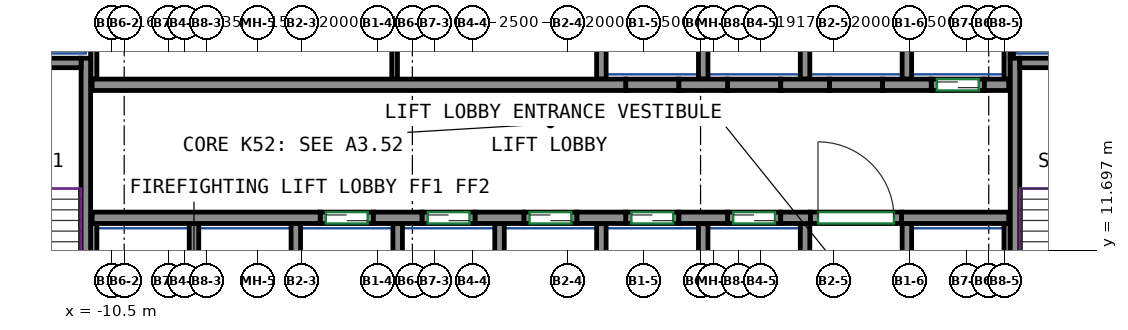
"""IFC4 building model, lengths in metres.
Left out: names, types, materials, properties, quantities, classifications, styles, units other than length and angle.
Written with IfcOpenShell. Run it as: python <this file> out.ifc"""

import sys

from ifc_helpers import new_model, si_unit, direction, frame, frame_2d, origin, place, context, subcontext, project, spatial, rectangle, extrude, source, transform, mapped, element, fill, save


model = new_model("IFC4")
c1 = context("Model", 3, precision=1e-05, world=origin(), true_north=direction((0.0, 1.0)))
c2 = subcontext(c1, "Body", "Model", "MODEL_VIEW")
j1 = project(units=[si_unit("LENGTHUNIT", "METRE"), si_unit("PLANEANGLEUNIT", "RADIAN")], contexts=[c1])
p1 = place(None, origin())
s1 = spatial("IfcSite", under=j1, at=p1, CompositionType="ELEMENT")
p2 = place(p1, origin())
s2 = spatial("IfcBuilding", under=s1, at=p2, CompositionType="ELEMENT")
p3 = place(p2, frame((0.0, 0.0, 210.1)))
s3 = spatial("IfcBuildingStorey", under=s2, at=p3, CompositionType="ELEMENT", Elevation=210.1)
m1 = source(origin(), c2, "Body", "SweptSolid", [
    extrude(rectangle(XDim=7.75, YDim=0.25, at=frame_2d((3.875, 0.0))), origin(), (0.0, 0.0, 1.0), 3.12),
])
p4 = place(p3, frame((-11.175, 9.0, 0.0), z_axis=(0.0, 0.0, 1.0), x_axis=(0.0, 1.0, 0.0)))
e1 = element("IfcWall", 1, at=p4, inside=s3, PredefinedType="SHEAR", context=c2, shape_type="MappedRepresentation", body=[
    mapped(m1, transform((0.0, 0.0, 0.0))),
])
m2 = source(origin(), c2, "Body", "SweptSolid", [
    extrude(rectangle(XDim=3.7, YDim=0.25, at=frame_2d((1.85, 0.0))), origin(), (0.0, 0.0, 1.0), 3.12),
])
p5 = place(p3, frame((-15.0, 16.625, 0.0), z_axis=(0.0, 0.0, 1.0), x_axis=(1.0, 0.0, 0.0)))
e2 = element("IfcWall", 2, at=p5, inside=s3, PredefinedType="SHEAR", context=c2, shape_type="MappedRepresentation", body=[
    mapped(m2, transform((0.0, 0.0, 0.0))),
])
p6 = place(p3, frame((13.275, 9.0, 0.0), z_axis=(0.0, 0.0, 1.0), x_axis=(0.0, 1.0, 0.0)))
e3 = element("IfcWall", 3, at=p6, inside=s3, PredefinedType="SHEAR", context=c2, shape_type="MappedRepresentation", body=[
    mapped(m1, transform((0.0, 0.0, 0.0))),
])
m3 = source(origin(), c2, "Body", "SweptSolid", [
    extrude(rectangle(XDim=3.7, YDim=0.25, at=frame_2d((1.85, 0.0))), origin(), (0.0, 0.0, 1.0), 3.12),
])
p7 = place(p3, frame((13.4, 16.625, 0.0), z_axis=(0.0, 0.0, 1.0), x_axis=(1.0, 0.0, 0.0)))
e4 = element("IfcWall", 4, at=p7, inside=s3, PredefinedType="SHEAR", context=c2, shape_type="MappedRepresentation", body=[
    mapped(m3, transform((0.0, 0.0, 0.0))),
])
m4 = source(origin(), c2, "Body", "SweptSolid", [
    extrude(rectangle(XDim=6.0, YDim=0.3, at=frame_2d((3.0, 0.0))), origin(), (0.0, 0.0, 1.0), 3.12),
])
p8 = place(p3, frame((-11.01, 12.55, 0.0), z_axis=(0.0, 0.0, 1.0), x_axis=(1.0, 0.0, 0.0)))
e5 = element("IfcWall", 5, at=p8, inside=s3, PredefinedType="SHEAR", context=c2, shape_type="MappedRepresentation", body=[
    mapped(m4, transform((0.0, 0.0, 0.0))),
])
m5 = source(origin(), c2, "Body", "SweptSolid", [
    extrude(rectangle(XDim=1.28, YDim=0.3, at=frame_2d((0.64, 0.0))), origin(), (0.0, 0.0, 1.0), 3.12),
])
for number, where, z_axis, x_axis in (
    (6, (-3.61, 12.55, 0.0), (0.0, 0.0, 1.0), (1.0, 0.0, 0.0)),
    (7, (-0.93, 12.55, 0.0), (0.0, 0.0, 1.0), (1.0, 0.0, 0.0)),
    (8, (1.75, 12.55, 0.0), (0.0, 0.0, 1.0), (1.0, 0.0, 0.0)),
    (9, (4.43, 12.55, 0.0), (0.0, 0.0, 1.0), (1.0, 0.0, 0.0)),
):
    element("IfcWall", number, at=place(p3, frame(where, z_axis=z_axis, x_axis=x_axis)), inside=s3, PredefinedType="SHEAR", context=c2, shape_type="MappedRepresentation", body=[
        mapped(m5, transform((0.0, 0.0, 0.0))),
    ])
m6 = source(origin(), c2, "Body", "SweptSolid", [
    extrude(rectangle(XDim=0.78, YDim=0.3, at=frame_2d((0.39, 0.0))), origin(), (0.0, 0.0, 1.0), 3.12),
])
p9 = place(p3, frame((7.11, 12.55, 0.0), z_axis=(0.0, 0.0, 1.0), x_axis=(1.0, 0.0, 0.0)))
e10 = element("IfcWall", 10, at=p9, inside=s3, PredefinedType="SHEAR", context=c2, shape_type="MappedRepresentation", body=[
    mapped(m6, transform((0.0, 0.0, 0.0))),
])
m7 = source(origin(), c2, "Body", "SweptSolid", [
    extrude(rectangle(XDim=2.82, YDim=0.3, at=frame_2d((1.41, 0.0))), origin(), (0.0, 0.0, 1.0), 3.12),
])
p10 = place(p3, frame((10.29, 12.55, 0.0), z_axis=(0.0, 0.0, 1.0), x_axis=(1.0, 0.0, 0.0)))
e11 = element("IfcWall", 11, at=p10, inside=s3, PredefinedType="SHEAR", context=c2, shape_type="MappedRepresentation", body=[
    mapped(m7, transform((0.0, 0.0, 0.0))),
])
m8 = source(origin(), c2, "Body", "SweptSolid", [
    extrude(rectangle(XDim=14.04, YDim=0.3, at=frame_2d((7.02, 0.0))), origin(), (0.0, 0.0, 1.0), 3.12),
])
p11 = place(p3, frame((-11.01, 16.05, 0.0), z_axis=(0.0, 0.0, 1.0), x_axis=(1.0, 0.0, 0.0)))
e12 = element("IfcWall", 12, at=p11, inside=s3, PredefinedType="SHEAR", context=c2, shape_type="MappedRepresentation", body=[
    mapped(m8, transform((0.0, 0.0, 0.0))),
])
p12 = place(p3, frame((4.43, 16.05, 0.0), z_axis=(0.0, 0.0, 1.0), x_axis=(1.0, 0.0, 0.0)))
e13 = element("IfcWall", 13, at=p12, inside=s3, PredefinedType="SHEAR", context=c2, shape_type="MappedRepresentation", body=[
    mapped(m5, transform((0.0, 0.0, 0.0))),
])
m9 = source(origin(), c2, "Body", "SweptSolid", [
    extrude(rectangle(XDim=1.28, YDim=0.3, at=frame_2d((0.64, 0.0))), origin(), (0.0, 0.0, 1.0), 3.12),
])
p13 = place(p3, frame((7.11, 16.05, 0.0), z_axis=(0.0, 0.0, 1.0), x_axis=(1.0, 0.0, 0.0)))
e14 = element("IfcWall", 14, at=p13, inside=s3, PredefinedType="SHEAR", context=c2, shape_type="MappedRepresentation", body=[
    mapped(m9, transform((0.0, 0.0, 0.0))),
])
p14 = place(p3, frame((9.79, 16.05, 0.0), z_axis=(0.0, 0.0, 1.0), x_axis=(1.0, 0.0, 0.0)))
e15 = element("IfcWall", 15, at=p14, inside=s3, PredefinedType="SHEAR", context=c2, shape_type="MappedRepresentation", body=[
    mapped(m5, transform((0.0, 0.0, 0.0))),
])
m10 = source(origin(), c2, "Body", "SweptSolid", [
    extrude(rectangle(XDim=0.64, YDim=0.3, at=frame_2d((0.32, 0.0))), origin(), (0.0, 0.0, 1.0), 3.12),
])
p15 = place(p3, frame((12.47, 16.05, 0.0), z_axis=(0.0, 0.0, 1.0), x_axis=(1.0, 0.0, 0.0)))
e16 = element("IfcWall", 16, at=p15, inside=s3, PredefinedType="SHEAR", context=c2, shape_type="MappedRepresentation", body=[
    mapped(m10, transform((0.0, 0.0, 0.0))),
])
m11 = source(origin(), c2, "Body", "SweptSolid", [
    extrude(rectangle(XDim=1.4, YDim=0.3, at=frame_2d((0.7, 0.0))), origin(), (0.0, 0.0, 1.0), 3.12),
])
p16 = place(p3, frame((-5.01, 12.55, 0.0), z_axis=(0.0, 0.0, 1.0), x_axis=(1.0, 0.0, 0.0)))
e17 = element("IfcWall", 17, at=p16, inside=s3, PredefinedType="PARTITIONING", context=c2, shape_type="MappedRepresentation", body=[
    mapped(m11, transform((0.0, 0.0, 0.0))),
])
p17 = place(p16, frame((0.15, 0.0, 0.0)))
e18 = element("IfcOpeningElement", 18, at=p17, cuts=e17, PredefinedType="OPENING", context=c2, shape_type="SweptSolid", body=[
    extrude(rectangle(XDim=1.1, YDim=2.1, at=frame_2d((0.55, 1.05))), frame((0.0, 0.16, 0.0), z_axis=(0.0, -1.0, 0.0), x_axis=(1.0, 0.0, 0.0)), (0.0, 0.0, 1.0), 0.32),
])
m12 = source(origin(), c2, "Body", "SweptSolid", [
    extrude(rectangle(XDim=1.4, YDim=0.3, at=frame_2d((0.7, 0.0))), origin(), (0.0, 0.0, 1.0), 3.12),
])
p18 = place(p3, frame((-2.33, 12.55, 0.0), z_axis=(0.0, 0.0, 1.0), x_axis=(1.0, 0.0, 0.0)))
e19 = element("IfcWall", 19, at=p18, inside=s3, PredefinedType="PARTITIONING", context=c2, shape_type="MappedRepresentation", body=[
    mapped(m12, transform((0.0, 0.0, 0.0))),
])
p19 = place(p18, frame((0.15, 0.0, 0.0)))
e20 = element("IfcOpeningElement", 20, at=p19, cuts=e19, PredefinedType="OPENING", context=c2, shape_type="SweptSolid", body=[
    extrude(rectangle(XDim=1.1, YDim=2.1, at=frame_2d((0.55, 1.05))), frame((0.0, 0.16, 0.0), z_axis=(0.0, -1.0, 0.0), x_axis=(1.0, 0.0, 0.0)), (0.0, 0.0, 1.0), 0.32),
])
p20 = place(p3, frame((0.35, 12.55, 0.0), z_axis=(0.0, 0.0, 1.0), x_axis=(1.0, 0.0, 0.0)))
e21 = element("IfcWall", 21, at=p20, inside=s3, PredefinedType="PARTITIONING", context=c2, shape_type="MappedRepresentation", body=[
    mapped(m11, transform((0.0, 0.0, 0.0))),
])
p21 = place(p20, frame((0.15, 0.0, 0.0)))
e22 = element("IfcOpeningElement", 22, at=p21, cuts=e21, PredefinedType="OPENING", context=c2, shape_type="SweptSolid", body=[
    extrude(rectangle(XDim=1.1, YDim=2.1, at=frame_2d((0.55, 1.05))), frame((0.0, 0.16, 0.0), z_axis=(0.0, -1.0, 0.0), x_axis=(1.0, 0.0, 0.0)), (0.0, 0.0, 1.0), 0.32),
])
p22 = place(p3, frame((3.03, 12.55, 0.0), z_axis=(0.0, 0.0, 1.0), x_axis=(1.0, 0.0, 0.0)))
e23 = element("IfcWall", 23, at=p22, inside=s3, PredefinedType="PARTITIONING", context=c2, shape_type="MappedRepresentation", body=[
    mapped(m11, transform((0.0, 0.0, 0.0))),
])
p23 = place(p22, frame((0.15, 0.0, 0.0)))
e24 = element("IfcOpeningElement", 24, at=p23, cuts=e23, PredefinedType="OPENING", context=c2, shape_type="SweptSolid", body=[
    extrude(rectangle(XDim=1.1, YDim=2.1, at=frame_2d((0.55, 1.05))), frame((0.0, 0.16, 0.0), z_axis=(0.0, -1.0, 0.0), x_axis=(1.0, 0.0, 0.0)), (0.0, 0.0, 1.0), 0.32),
])
p24 = place(p3, frame((5.71, 12.55, 0.0), z_axis=(0.0, 0.0, 1.0), x_axis=(1.0, 0.0, 0.0)))
e25 = element("IfcWall", 25, at=p24, inside=s3, PredefinedType="PARTITIONING", context=c2, shape_type="MappedRepresentation", body=[
    mapped(m12, transform((0.0, 0.0, 0.0))),
])
p25 = place(p24, frame((0.15, 0.0, 0.0)))
e26 = element("IfcOpeningElement", 26, at=p25, cuts=e25, PredefinedType="OPENING", context=c2, shape_type="SweptSolid", body=[
    extrude(rectangle(XDim=1.1, YDim=2.1, at=frame_2d((0.55, 1.05))), frame((0.0, 0.16, 0.0), z_axis=(0.0, -1.0, 0.0), x_axis=(1.0, 0.0, 0.0)), (0.0, 0.0, 1.0), 0.32),
])
p26 = place(p3, frame((11.07, 16.05, 0.0), z_axis=(0.0, 0.0, 1.0), x_axis=(1.0, 0.0, 0.0)))
e27 = element("IfcWall", 27, at=p26, inside=s3, PredefinedType="PARTITIONING", context=c2, shape_type="MappedRepresentation", body=[
    mapped(m11, transform((0.0, 0.0, 0.0))),
])
p27 = place(p26, frame((0.15, 0.0, 0.0)))
e28 = element("IfcOpeningElement", 28, at=p27, cuts=e27, PredefinedType="OPENING", context=c2, shape_type="SweptSolid", body=[
    extrude(rectangle(XDim=1.1, YDim=2.1, at=frame_2d((0.55, 1.05))), frame((0.0, 0.16, 0.0), z_axis=(0.0, -1.0, 0.0), x_axis=(1.0, 0.0, 0.0)), (0.0, 0.0, 1.0), 0.32),
])
m13 = source(origin(), c2, "Body", "SweptSolid", [
    extrude(rectangle(XDim=2.4, YDim=0.3, at=frame_2d((1.2, 0.0))), origin(), (0.0, 0.0, 1.0), 3.12),
])
p28 = place(p3, frame((7.89, 12.55, 0.0), z_axis=(0.0, 0.0, 1.0), x_axis=(1.0, 0.0, 0.0)))
e29 = element("IfcWall", 29, at=p28, inside=s3, PredefinedType="PARTITIONING", context=c2, shape_type="MappedRepresentation", body=[
    mapped(m13, transform((0.0, 0.0, 0.0))),
])
p29 = place(p28, frame((0.2, 0.0, 0.0)))
e30 = element("IfcOpeningElement", 30, at=p29, cuts=e29, PredefinedType="OPENING", context=c2, shape_type="SweptSolid", body=[
    extrude(rectangle(XDim=2.0, YDim=2.1, at=frame_2d((1.0, 1.05))), frame((0.0, 0.16, 0.0), z_axis=(0.0, -1.0, 0.0), x_axis=(1.0, 0.0, 0.0)), (0.0, 0.0, 1.0), 0.32),
])
p30 = place(p3, frame((3.03, 16.05, 0.0), z_axis=(0.0, 0.0, 1.0), x_axis=(1.0, 0.0, 0.0)))
e31 = element("IfcWall", 31, at=p30, inside=s3, PredefinedType="PARTITIONING", context=c2, shape_type="MappedRepresentation", body=[
    mapped(m11, transform((0.0, 0.0, 0.0))),
])
for number, where, z_axis, x_axis in (
    (32, (5.71, 16.05, 0.0), (0.0, 0.0, 1.0), (1.0, 0.0, 0.0)),
    (33, (8.39, 16.05, 0.0), (0.0, 0.0, 1.0), (1.0, 0.0, 0.0)),
):
    element("IfcWall", number, at=place(p3, frame(where, z_axis=z_axis, x_axis=x_axis)), inside=s3, PredefinedType="PARTITIONING", context=c2, shape_type="MappedRepresentation", body=[
        mapped(m12, transform((0.0, 0.0, 0.0))),
    ])
m14 = source(origin(), c2, "Body", "SweptSolid", [
    extrude(rectangle(XDim=3.275, YDim=0.165, at=frame_2d((1.638, 0.0))), origin(), (0.0, 0.0, 1.0), 3.12),
])
p31 = place(p3, frame((13.067, 16.2, 0.0), z_axis=(0.0, 0.0, 1.0), x_axis=(0.0, 1.0, 0.0)))
e34 = element("IfcWall", 34, at=p31, inside=s3, PredefinedType="PARTITIONING", context=c2, shape_type="MappedRepresentation", body=[
    mapped(m14, transform((0.0, 0.0, 0.0))),
])
m15 = source(origin(), c2, "Body", "SweptSolid", [
    extrude(rectangle(XDim=4.8, YDim=0.165, at=frame_2d((2.4, 0.0))), origin(), (0.0, 0.0, 1.0), 3.12),
])
p32 = place(p3, frame((-10.968, 16.2, 0.0), z_axis=(0.0, 0.0, 1.0), x_axis=(0.0, 1.0, 0.0)))
e35 = element("IfcWall", 35, at=p32, inside=s3, PredefinedType="PARTITIONING", context=c2, shape_type="MappedRepresentation", body=[
    mapped(m15, transform((0.0, 0.0, 0.0))),
])
m16 = source(origin(), c2, "Body", "SweptSolid", [
    extrude(rectangle(XDim=3.275, YDim=0.25, at=frame_2d((1.638, 0.0))), origin(), (0.0, 0.0, 1.0), 3.12),
])
p33 = place(p3, frame((10.43, 16.2, 0.0), z_axis=(0.0, 0.0, 1.0), x_axis=(0.0, 1.0, 0.0)))
e36 = element("IfcWall", 36, at=p33, inside=s3, PredefinedType="PARTITIONING", context=c2, shape_type="MappedRepresentation", body=[
    mapped(m16, transform((0.0, 0.0, 0.0))),
])
m17 = source(origin(), c2, "Body", "SweptSolid", [
    extrude(rectangle(XDim=2.725, YDim=0.085, at=frame_2d((1.363, 0.0))), origin(), (0.0, 0.0, 1.0), 3.12),
])
p34 = place(p3, frame((13.192, 16.75, 0.0), z_axis=(0.0, 0.0, 1.0), x_axis=(0.0, 1.0, 0.0)))
e37 = element("IfcWall", 37, at=p34, inside=s3, PredefinedType="PARTITIONING", context=c2, shape_type="MappedRepresentation", body=[
    mapped(m17, transform((0.0, 0.0, 0.0))),
])
for number, where, z_axis, x_axis in (
    (38, (2.39, 16.2, 0.0), (0.0, 0.0, 1.0), (0.0, 1.0, 0.0)),
    (39, (5.07, 16.2, 0.0), (0.0, 0.0, 1.0), (0.0, 1.0, 0.0)),
    (40, (7.75, 16.2, 0.0), (0.0, 0.0, 1.0), (0.0, 1.0, 0.0)),
):
    element("IfcWall", number, at=place(p3, frame(where, z_axis=z_axis, x_axis=x_axis)), inside=s3, PredefinedType="PARTITIONING", context=c2, shape_type="MappedRepresentation", body=[
        mapped(m16, transform((0.0, 0.0, 0.0))),
    ])
m18 = source(origin(), c2, "Body", "SweptSolid", [
    extrude(rectangle(XDim=3.4, YDim=0.25, at=frame_2d((1.7, 0.0))), origin(), (0.0, 0.0, 1.0), 3.12),
])
p35 = place(p3, frame((10.43, 9.0, 0.0), z_axis=(0.0, 0.0, 1.0), x_axis=(0.0, 1.0, 0.0)))
e41 = element("IfcWall", 41, at=p35, inside=s3, PredefinedType="PARTITIONING", context=c2, shape_type="MappedRepresentation", body=[
    mapped(m18, transform((0.0, 0.0, 0.0))),
])
m19 = source(origin(), c2, "Body", "SweptSolid", [
    extrude(rectangle(XDim=3.4, YDim=0.165, at=frame_2d((1.7, 0.0))), origin(), (0.0, 0.0, 1.0), 3.12),
])
p36 = place(p3, frame((13.067, 9.0, 0.0), z_axis=(0.0, 0.0, 1.0), x_axis=(0.0, 1.0, 0.0)))
e42 = element("IfcWall", 42, at=p36, inside=s3, PredefinedType="PARTITIONING", context=c2, shape_type="MappedRepresentation", body=[
    mapped(m19, transform((0.0, 0.0, 0.0))),
])
for number, where, z_axis, x_axis in (
    (43, (2.39, 9.0, 0.0), (0.0, 0.0, 1.0), (0.0, 1.0, 0.0)),
    (44, (5.07, 9.0, 0.0), (0.0, 0.0, 1.0), (0.0, 1.0, 0.0)),
    (45, (7.75, 9.0, 0.0), (0.0, 0.0, 1.0), (0.0, 1.0, 0.0)),
    (46, (-0.29, 9.0, 0.0), (0.0, 0.0, 1.0), (0.0, 1.0, 0.0)),
):
    element("IfcWall", number, at=place(p3, frame(where, z_axis=z_axis, x_axis=x_axis)), inside=s3, PredefinedType="PARTITIONING", context=c2, shape_type="MappedRepresentation", body=[
        mapped(m18, transform((0.0, 0.0, 0.0))),
    ])
p37 = place(p3, frame((-10.968, 9.0, 0.0), z_axis=(0.0, 0.0, 1.0), x_axis=(0.0, 1.0, 0.0)))
e47 = element("IfcWall", 47, at=p37, inside=s3, PredefinedType="PARTITIONING", context=c2, shape_type="MappedRepresentation", body=[
    mapped(m19, transform((0.0, 0.0, 0.0))),
])
for number, where, z_axis, x_axis in (
    (48, (-2.97, 9.0, 0.0), (0.0, 0.0, 1.0), (0.0, 1.0, 0.0)),
    (49, (-5.65, 9.0, 0.0), (0.0, 0.0, 1.0), (0.0, 1.0, 0.0)),
    (50, (-8.33, 9.0, 0.0), (0.0, 0.0, 1.0), (0.0, 1.0, 0.0)),
):
    element("IfcWall", number, at=place(p3, frame(where, z_axis=z_axis, x_axis=x_axis)), inside=s3, PredefinedType="PARTITIONING", context=c2, shape_type="MappedRepresentation", body=[
        mapped(m18, transform((0.0, 0.0, 0.0))),
    ])
m20 = source(origin(), c2, "Body", "SweptSolid", [
    extrude(rectangle(XDim=4.8, YDim=0.15, at=frame_2d((2.4, 0.0))), origin(), (0.0, 0.0, 1.0), 3.12),
])
p38 = place(p3, frame((-3.05, 16.2, 0.0), z_axis=(0.0, 0.0, 1.0), x_axis=(0.0, 1.0, 0.0)))
e51 = element("IfcWall", 51, at=p38, inside=s3, PredefinedType="PARTITIONING", context=c2, shape_type="MappedRepresentation", body=[
    mapped(m20, transform((0.0, 0.0, 0.0))),
])
p39 = place(p29, origin())
e52 = element("IfcDoor", 52, at=p39, inside=s3, OperationType="DOUBLE_DOOR_SINGLE_SWING", PredefinedType="DOOR", context=c2, shape_type="SweptSolid", body=[
    extrude(rectangle(XDim=2.0, YDim=2.1, at=frame_2d((1.0, 1.05))), frame((0.0, 0.025, 0.0), z_axis=(0.0, -1.0, 0.0), x_axis=(1.0, 0.0, 0.0)), (0.0, 0.0, 1.0), 0.05),
])
fill(e30, e52)
p40 = place(p17, origin())
e53 = element("IfcDoor", 53, at=p40, inside=s3, OperationType="DOUBLE_DOOR_SLIDING", PredefinedType="DOOR", context=c2, shape_type="SweptSolid", body=[
    extrude(rectangle(XDim=1.1, YDim=2.1, at=frame_2d((0.55, 1.05))), frame((0.0, 0.025, 0.0), z_axis=(0.0, -1.0, 0.0), x_axis=(1.0, 0.0, 0.0)), (0.0, 0.0, 1.0), 0.05),
])
fill(e18, e53)
p41 = place(p19, origin())
e54 = element("IfcDoor", 54, at=p41, inside=s3, OperationType="DOUBLE_DOOR_SLIDING", PredefinedType="DOOR", context=c2, shape_type="SweptSolid", body=[
    extrude(rectangle(XDim=1.1, YDim=2.1, at=frame_2d((0.55, 1.05))), frame((0.0, 0.025, 0.0), z_axis=(0.0, -1.0, 0.0), x_axis=(1.0, 0.0, 0.0)), (0.0, 0.0, 1.0), 0.05),
])
fill(e20, e54)
p42 = place(p21, origin())
e55 = element("IfcDoor", 55, at=p42, inside=s3, OperationType="DOUBLE_DOOR_SLIDING", PredefinedType="DOOR", context=c2, shape_type="SweptSolid", body=[
    extrude(rectangle(XDim=1.1, YDim=2.1, at=frame_2d((0.55, 1.05))), frame((0.0, 0.025, 0.0), z_axis=(0.0, -1.0, 0.0), x_axis=(1.0, 0.0, 0.0)), (0.0, 0.0, 1.0), 0.05),
])
fill(e22, e55)
p43 = place(p23, origin())
e56 = element("IfcDoor", 56, at=p43, inside=s3, OperationType="DOUBLE_DOOR_SLIDING", PredefinedType="DOOR", context=c2, shape_type="SweptSolid", body=[
    extrude(rectangle(XDim=1.1, YDim=2.1, at=frame_2d((0.55, 1.05))), frame((0.0, 0.025, 0.0), z_axis=(0.0, -1.0, 0.0), x_axis=(1.0, 0.0, 0.0)), (0.0, 0.0, 1.0), 0.05),
])
fill(e24, e56)
p44 = place(p25, origin())
e57 = element("IfcDoor", 57, at=p44, inside=s3, OperationType="DOUBLE_DOOR_SLIDING", PredefinedType="DOOR", context=c2, shape_type="SweptSolid", body=[
    extrude(rectangle(XDim=1.1, YDim=2.1, at=frame_2d((0.55, 1.05))), frame((0.0, 0.025, 0.0), z_axis=(0.0, -1.0, 0.0), x_axis=(1.0, 0.0, 0.0)), (0.0, 0.0, 1.0), 0.05),
])
fill(e26, e57)
p45 = place(p27, origin())
e58 = element("IfcDoor", 58, at=p45, inside=s3, OperationType="DOUBLE_DOOR_SLIDING", PredefinedType="DOOR", context=c2, shape_type="SweptSolid", body=[
    extrude(rectangle(XDim=1.1, YDim=2.1, at=frame_2d((0.55, 1.05))), frame((0.0, 0.025, 0.0), z_axis=(0.0, -1.0, 0.0), x_axis=(1.0, 0.0, 0.0)), (0.0, 0.0, 1.0), 0.05),
])
fill(e28, e58)
save(model, sys.argv[1])
